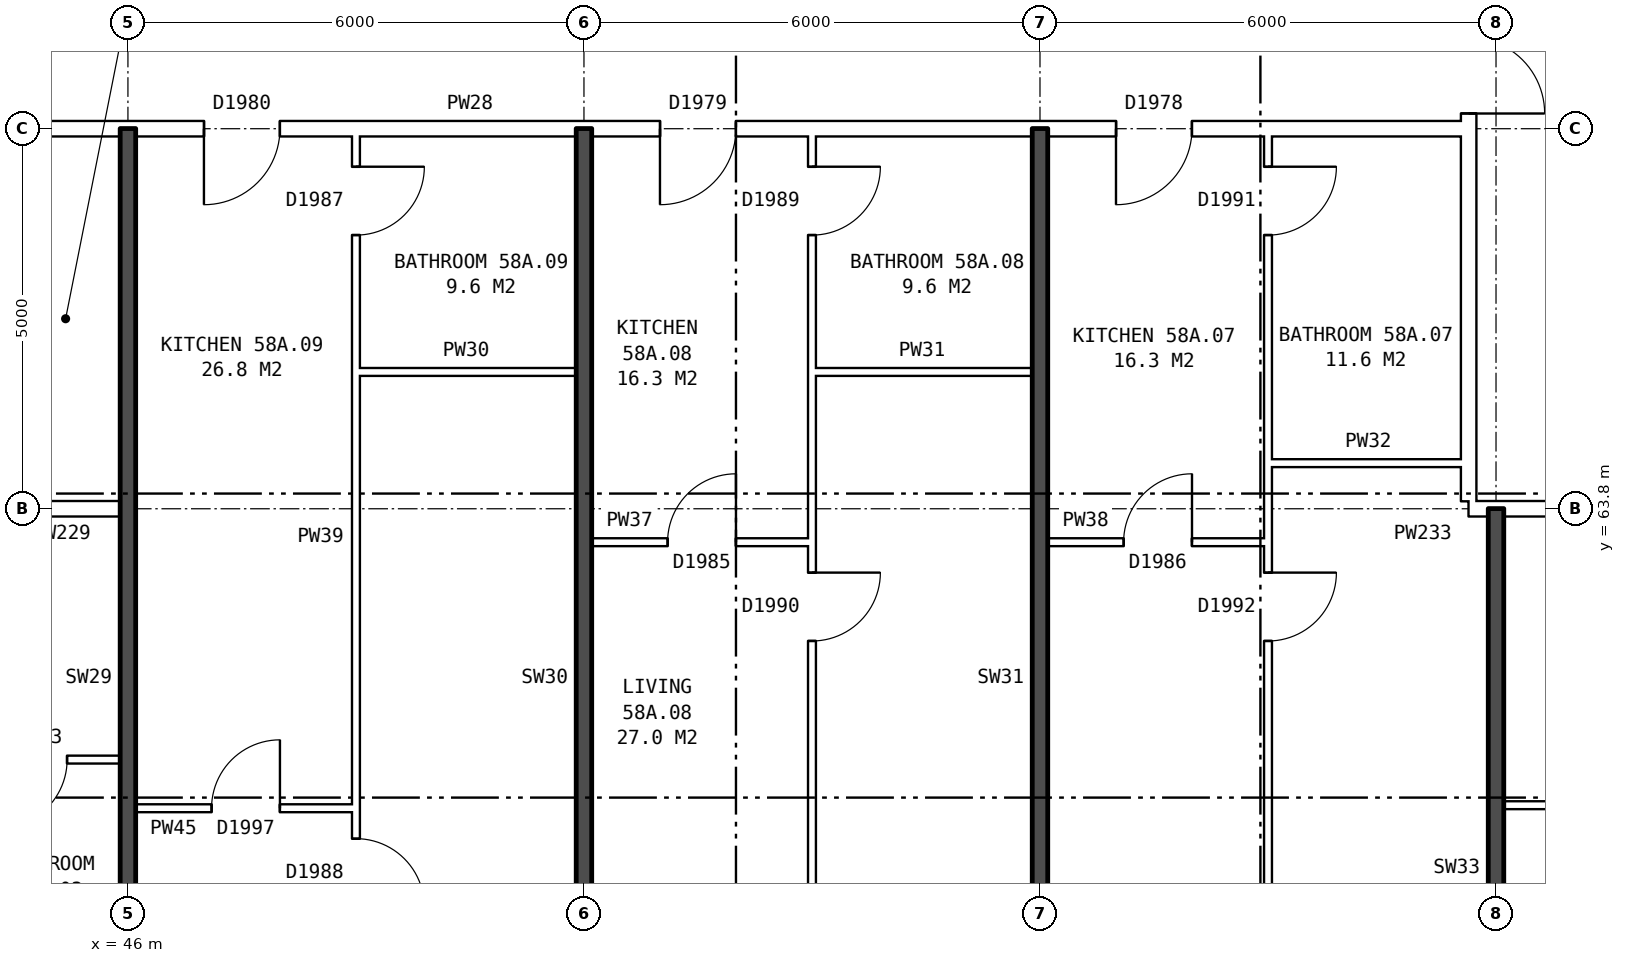
"""IFC4 building model, lengths in metres.
Left out: names, types, materials, properties, quantities, classifications, styles, units other than length and angle.
Written with IfcOpenShell. Run it as: python <this file> out.ifc"""

import sys

from ifc_helpers import new_model, si_unit, direction, frame, frame_2d, origin, place, context, subcontext, project, spatial, rectangle, extrude, element, fill, save


model = new_model("IFC4")
c1 = context("Model", 3, precision=1e-05, world=origin(), true_north=direction((0.0, 1.0)))
c2 = subcontext(c1, "Body", "Model", "MODEL_VIEW")
j1 = project(units=[si_unit("LENGTHUNIT", "METRE"), si_unit("PLANEANGLEUNIT", "RADIAN")], contexts=[c1])
p1 = place(None, origin())
s1 = spatial("IfcSite", under=j1, at=p1, CompositionType="ELEMENT")
p2 = place(p1, origin())
s2 = spatial("IfcBuilding", under=s1, at=p2, CompositionType="ELEMENT")
p3 = place(p2, frame((0.0, 0.0, 205.9)))
s3 = spatial("IfcBuildingStorey", under=s2, at=p3, CompositionType="ELEMENT", Elevation=205.9)
p4 = place(p3, frame((63.64, 63.9, 0.0), z_axis=(0.0, 0.0, 1.0), x_axis=(0.0, 1.0, 0.0)))
e1 = element("IfcWall", 1, at=p4, inside=s3, PredefinedType="PARTITIONING", context=c2, shape_type="SweptSolid", body=[
    extrude(rectangle(XDim=12.2, YDim=0.2, at=frame_2d((6.1, 0.0))), origin(), (0.0, 0.0, 1.0), 2.85),
])
p5 = place(p4, frame((5.1, 0.0, 0.0)))
e2 = element("IfcOpeningElement", 2, at=p5, cuts=e1, PredefinedType="OPENING", context=c2, shape_type="SweptSolid", body=[
    extrude(rectangle(XDim=2.0, YDim=2.1, at=frame_2d((1.0, 1.05))), frame((0.0, 0.11, 0.0), z_axis=(0.0, -1.0, 0.0), x_axis=(1.0, 0.0, 0.0)), (0.0, 0.0, 1.0), 0.22),
])
p6 = place(p3, frame((46.1, 59.86, 0.0), z_axis=(0.0, 0.0, 1.0), x_axis=(1.0, 0.0, 0.0)))
e3 = element("IfcWall", 3, at=p6, inside=s3, PredefinedType="PARTITIONING", context=c2, shape_type="SweptSolid", body=[
    extrude(rectangle(XDim=2.9, YDim=0.1, at=frame_2d((1.45, 0.0))), origin(), (0.0, 0.0, 1.0), 2.85),
])
p7 = place(p6, frame((1.0, 0.0, 0.0)))
e4 = element("IfcOpeningElement", 4, at=p7, cuts=e3, PredefinedType="OPENING", context=c2, shape_type="SweptSolid", body=[
    extrude(rectangle(XDim=0.9, YDim=2.1, at=frame_2d((0.45, 1.05))), frame((0.0, 0.06, 0.0), z_axis=(0.0, -1.0, 0.0), x_axis=(1.0, 0.0, 0.0)), (0.0, 0.0, 1.0), 0.12),
])
p8 = place(p3, frame((64.1, 59.9, 0.0), z_axis=(0.0, 0.0, 1.0), x_axis=(1.0, 0.0, 0.0)))
e5 = element("IfcWall", 5, at=p8, inside=s3, PredefinedType="PARTITIONING", context=c2, shape_type="SweptSolid", body=[
    extrude(rectangle(XDim=5.8, YDim=0.1, at=frame_2d((2.9, 0.0))), origin(), (0.0, 0.0, 1.0), 2.85),
])
p9 = place(p8, frame((3.6, 0.0, 0.0)))
e6 = element("IfcOpeningElement", 6, at=p9, cuts=e5, PredefinedType="OPENING", context=c2, shape_type="SweptSolid", body=[
    extrude(rectangle(XDim=0.9, YDim=2.1, at=frame_2d((0.45, 1.05))), frame((0.0, 0.06, 0.0), z_axis=(0.0, -1.0, 0.0), x_axis=(1.0, 0.0, 0.0)), (0.0, 0.0, 1.0), 0.12),
])
p10 = place(p8, frame((0.7, 0.0, 0.0)))
e7 = element("IfcOpeningElement", 7, at=p10, cuts=e5, PredefinedType="OPENING", context=c2, shape_type="SweptSolid", body=[
    extrude(rectangle(XDim=0.9, YDim=2.1, at=frame_2d((0.45, 1.05))), frame((0.0, 0.06, 0.0), z_axis=(0.0, -1.0, 0.0), x_axis=(1.0, 0.0, 0.0)), (0.0, 0.0, 1.0), 0.12),
])
p11 = place(p3, frame((40.1, 60.5, 0.0), z_axis=(0.0, 0.0, 1.0), x_axis=(1.0, 0.0, 0.0)))
e8 = element("IfcWall", 8, at=p11, inside=s3, PredefinedType="PARTITIONING", context=c2, shape_type="SweptSolid", body=[
    extrude(rectangle(XDim=5.8, YDim=0.1, at=frame_2d((2.9, 0.0))), origin(), (0.0, 0.0, 1.0), 2.85),
])
p12 = place(p11, frame((1.3, 0.0, 0.0)))
e9 = element("IfcOpeningElement", 9, at=p12, cuts=e8, PredefinedType="OPENING", context=c2, shape_type="SweptSolid", body=[
    extrude(rectangle(XDim=0.9, YDim=2.1, at=frame_2d((0.45, 1.05))), frame((0.0, 0.06, 0.0), z_axis=(0.0, -1.0, 0.0), x_axis=(1.0, 0.0, 0.0)), (0.0, 0.0, 1.0), 0.12),
])
p13 = place(p11, frame((4.2, 0.0, 0.0)))
e10 = element("IfcOpeningElement", 10, at=p13, cuts=e8, PredefinedType="OPENING", context=c2, shape_type="SweptSolid", body=[
    extrude(rectangle(XDim=0.9, YDim=2.1, at=frame_2d((0.45, 1.05))), frame((0.0, 0.06, 0.0), z_axis=(0.0, -1.0, 0.0), x_axis=(1.0, 0.0, 0.0)), (0.0, 0.0, 1.0), 0.12),
])
p14 = place(p3, frame((52.1, 63.36, 0.0), z_axis=(0.0, 0.0, 1.0), x_axis=(1.0, 0.0, 0.0)))
e11 = element("IfcWall", 11, at=p14, inside=s3, PredefinedType="PARTITIONING", context=c2, shape_type="SweptSolid", body=[
    extrude(rectangle(XDim=2.9, YDim=0.1, at=frame_2d((1.45, 0.0))), origin(), (0.0, 0.0, 1.0), 2.85),
])
p15 = place(p14, frame((1.0, 0.0, 0.0)))
e12 = element("IfcOpeningElement", 12, at=p15, cuts=e11, PredefinedType="OPENING", context=c2, shape_type="SweptSolid", body=[
    extrude(rectangle(XDim=0.9, YDim=2.1, at=frame_2d((0.45, 1.05))), frame((0.0, 0.06, 0.0), z_axis=(0.0, -1.0, 0.0), x_axis=(1.0, 0.0, 0.0)), (0.0, 0.0, 1.0), 0.12),
])
p16 = place(p3, frame((58.1, 63.36, 0.0), z_axis=(0.0, 0.0, 1.0), x_axis=(1.0, 0.0, 0.0)))
e13 = element("IfcWall", 13, at=p16, inside=s3, PredefinedType="PARTITIONING", context=c2, shape_type="SweptSolid", body=[
    extrude(rectangle(XDim=2.9, YDim=0.1, at=frame_2d((1.45, 0.0))), origin(), (0.0, 0.0, 1.0), 2.85),
])
p17 = place(p16, frame((1.0, 0.0, 0.0)))
e14 = element("IfcOpeningElement", 14, at=p17, cuts=e13, PredefinedType="OPENING", context=c2, shape_type="SweptSolid", body=[
    extrude(rectangle(XDim=0.9, YDim=2.1, at=frame_2d((0.45, 1.05))), frame((0.0, 0.06, 0.0), z_axis=(0.0, -1.0, 0.0), x_axis=(1.0, 0.0, 0.0)), (0.0, 0.0, 1.0), 0.12),
])
p18 = place(p3, frame((44.36, 63.8, 0.0), z_axis=(0.0, 0.0, 1.0), x_axis=(1.0, 0.0, 0.0)))
e15 = element("IfcWall", 15, at=p18, inside=s3, PredefinedType="PARTITIONING", context=c2, shape_type="SweptSolid", body=[
    extrude(rectangle(XDim=1.54, YDim=0.2, at=frame_2d((0.77, 0.0))), origin(), (0.0, 0.0, 1.0), 2.85),
])
p19 = place(p3, frame((63.64, 63.8, 0.0), z_axis=(0.0, 0.0, 1.0), x_axis=(1.0, 0.0, 0.0)))
e16 = element("IfcWall", 16, at=p19, inside=s3, PredefinedType="PARTITIONING", context=c2, shape_type="SweptSolid", body=[
    extrude(rectangle(XDim=3.0, YDim=0.2, at=frame_2d((1.5, 0.0))), origin(), (0.0, 0.0, 1.0), 2.85),
])
p20 = place(p19, frame((1.18, 0.0, 0.0)))
e17 = element("IfcOpeningElement", 17, at=p20, cuts=e16, PredefinedType="OPENING", context=c2, shape_type="SweptSolid", body=[
    extrude(rectangle(XDim=1.0, YDim=2.1, at=frame_2d((0.5, 1.05))), frame((0.0, 0.11, 0.0), z_axis=(0.0, -1.0, 0.0), x_axis=(1.0, 0.0, 0.0)), (0.0, 0.0, 1.0), 0.22),
])
p21 = place(p3, frame((61.0, 64.4, 0.0), z_axis=(0.0, 0.0, 1.0), x_axis=(1.0, 0.0, 0.0)))
e18 = element("IfcWall", 18, at=p21, inside=s3, PredefinedType="PARTITIONING", context=c2, shape_type="SweptSolid", body=[
    extrude(rectangle(XDim=2.64, YDim=0.1, at=frame_2d((1.32, 0.0))), origin(), (0.0, 0.0, 1.0), 2.85),
])
for number, where, z_axis, x_axis in (
    (19, (49.0, 65.6, 0.0), (0.0, 0.0, 1.0), (1.0, 0.0, 0.0)),
    (20, (55.0, 65.6, 0.0), (0.0, 0.0, 1.0), (1.0, 0.0, 0.0)),
):
    element("IfcWall", number, at=place(p3, frame(where, z_axis=z_axis, x_axis=x_axis)), inside=s3, PredefinedType="PARTITIONING", context=c2, shape_type="SweptSolid", body=[
        extrude(rectangle(XDim=2.9, YDim=0.1, at=frame_2d((1.45, 0.0))), origin(), (0.0, 0.0, 1.0), 2.85),
    ])
p22 = place(p3, frame((44.36, 68.8, 0.0), z_axis=(0.0, 0.0, 1.0), x_axis=(1.0, 0.0, 0.0)))
e21 = element("IfcWall", 21, at=p22, inside=s3, PredefinedType="PARTITIONING", context=c2, shape_type="SweptSolid", body=[
    extrude(rectangle(XDim=19.28, YDim=0.2, at=frame_2d((9.64, 0.0))), origin(), (0.0, 0.0, 1.0), 2.85),
])
p23 = place(p22, frame((14.64, 0.0, 0.0)))
e22 = element("IfcOpeningElement", 22, at=p23, cuts=e21, PredefinedType="OPENING", context=c2, shape_type="SweptSolid", body=[
    extrude(rectangle(XDim=1.0, YDim=2.1, at=frame_2d((0.5, 1.05))), frame((0.0, 0.11, 0.0), z_axis=(0.0, -1.0, 0.0), x_axis=(1.0, 0.0, 0.0)), (0.0, 0.0, 1.0), 0.22),
])
p24 = place(p22, frame((8.64, 0.0, 0.0)))
e23 = element("IfcOpeningElement", 23, at=p24, cuts=e21, PredefinedType="OPENING", context=c2, shape_type="SweptSolid", body=[
    extrude(rectangle(XDim=1.0, YDim=2.1, at=frame_2d((0.5, 1.05))), frame((0.0, 0.11, 0.0), z_axis=(0.0, -1.0, 0.0), x_axis=(1.0, 0.0, 0.0)), (0.0, 0.0, 1.0), 0.22),
])
p25 = place(p22, frame((2.64, 0.0, 0.0)))
e24 = element("IfcOpeningElement", 24, at=p25, cuts=e21, PredefinedType="OPENING", context=c2, shape_type="SweptSolid", body=[
    extrude(rectangle(XDim=1.0, YDim=2.1, at=frame_2d((0.5, 1.05))), frame((0.0, 0.11, 0.0), z_axis=(0.0, -1.0, 0.0), x_axis=(1.0, 0.0, 0.0)), (0.0, 0.0, 1.0), 0.22),
])
p26 = place(p3, frame((46.0, 54.36, 0.0), z_axis=(0.0, 0.0, 1.0), x_axis=(0.0, 1.0, 0.0)))
e25 = element("IfcWall", 25, at=p26, inside=s3, PredefinedType="SOLIDWALL", context=c2, shape_type="SweptSolid", body=[
    extrude(rectangle(XDim=14.44, YDim=0.2, at=frame_2d((7.22, 0.0))), origin(), (0.0, 0.0, 1.0), 2.85),
])
p27 = place(p3, frame((49.0, 54.36, 0.0), z_axis=(0.0, 0.0, 1.0), x_axis=(0.0, 1.0, 0.0)))
e26 = element("IfcWall", 26, at=p27, inside=s3, PredefinedType="PARTITIONING", context=c2, shape_type="SweptSolid", body=[
    extrude(rectangle(XDim=14.34, YDim=0.1, at=frame_2d((7.17, 0.0))), origin(), (0.0, 0.0, 1.0), 2.85),
])
p28 = place(p27, frame((4.2, 0.0, 0.0)))
e27 = element("IfcOpeningElement", 27, at=p28, cuts=e26, PredefinedType="OPENING", context=c2, shape_type="SweptSolid", body=[
    extrude(rectangle(XDim=0.9, YDim=2.1, at=frame_2d((0.45, 1.05))), frame((0.0, 0.06, 0.0), z_axis=(0.0, -1.0, 0.0), x_axis=(1.0, 0.0, 0.0)), (0.0, 0.0, 1.0), 0.12),
])
p29 = place(p27, frame((13.04, 0.0, 0.0)))
e28 = element("IfcOpeningElement", 28, at=p29, cuts=e26, PredefinedType="OPENING", context=c2, shape_type="SweptSolid", body=[
    extrude(rectangle(XDim=0.9, YDim=2.1, at=frame_2d((0.45, 1.05))), frame((0.0, 0.06, 0.0), z_axis=(0.0, -1.0, 0.0), x_axis=(1.0, 0.0, 0.0)), (0.0, 0.0, 1.0), 0.12),
])
p30 = place(p3, frame((52.0, 54.36, 0.0), z_axis=(0.0, 0.0, 1.0), x_axis=(0.0, 1.0, 0.0)))
e29 = element("IfcWall", 29, at=p30, inside=s3, PredefinedType="SOLIDWALL", context=c2, shape_type="SweptSolid", body=[
    extrude(rectangle(XDim=14.44, YDim=0.2, at=frame_2d((7.22, 0.0))), origin(), (0.0, 0.0, 1.0), 2.85),
])
p31 = place(p3, frame((55.0, 54.36, 0.0), z_axis=(0.0, 0.0, 1.0), x_axis=(0.0, 1.0, 0.0)))
e30 = element("IfcWall", 30, at=p31, inside=s3, PredefinedType="PARTITIONING", context=c2, shape_type="SweptSolid", body=[
    extrude(rectangle(XDim=14.34, YDim=0.1, at=frame_2d((7.17, 0.0))), origin(), (0.0, 0.0, 1.0), 2.85),
])
p32 = place(p31, frame((7.7, 0.0, 0.0)))
e31 = element("IfcOpeningElement", 31, at=p32, cuts=e30, PredefinedType="OPENING", context=c2, shape_type="SweptSolid", body=[
    extrude(rectangle(XDim=0.9, YDim=2.1, at=frame_2d((0.45, 1.05))), frame((0.0, 0.06, 0.0), z_axis=(0.0, -1.0, 0.0), x_axis=(1.0, 0.0, 0.0)), (0.0, 0.0, 1.0), 0.12),
])
p33 = place(p31, frame((13.04, 0.0, 0.0)))
e32 = element("IfcOpeningElement", 32, at=p33, cuts=e30, PredefinedType="OPENING", context=c2, shape_type="SweptSolid", body=[
    extrude(rectangle(XDim=0.9, YDim=2.1, at=frame_2d((0.45, 1.05))), frame((0.0, 0.06, 0.0), z_axis=(0.0, -1.0, 0.0), x_axis=(1.0, 0.0, 0.0)), (0.0, 0.0, 1.0), 0.12),
])
p34 = place(p3, frame((58.0, 54.36, 0.0), z_axis=(0.0, 0.0, 1.0), x_axis=(0.0, 1.0, 0.0)))
e33 = element("IfcWall", 33, at=p34, inside=s3, PredefinedType="SOLIDWALL", context=c2, shape_type="SweptSolid", body=[
    extrude(rectangle(XDim=14.44, YDim=0.2, at=frame_2d((7.22, 0.0))), origin(), (0.0, 0.0, 1.0), 2.85),
])
p35 = place(p3, frame((61.0, 54.36, 0.0), z_axis=(0.0, 0.0, 1.0), x_axis=(0.0, 1.0, 0.0)))
e34 = element("IfcWall", 34, at=p35, inside=s3, PredefinedType="PARTITIONING", context=c2, shape_type="SweptSolid", body=[
    extrude(rectangle(XDim=14.34, YDim=0.1, at=frame_2d((7.17, 0.0))), origin(), (0.0, 0.0, 1.0), 2.85),
])
p36 = place(p35, frame((7.7, 0.0, 0.0)))
e35 = element("IfcOpeningElement", 35, at=p36, cuts=e34, PredefinedType="OPENING", context=c2, shape_type="SweptSolid", body=[
    extrude(rectangle(XDim=0.9, YDim=2.1, at=frame_2d((0.45, 1.05))), frame((0.0, 0.06, 0.0), z_axis=(0.0, -1.0, 0.0), x_axis=(1.0, 0.0, 0.0)), (0.0, 0.0, 1.0), 0.12),
])
p37 = place(p35, frame((13.04, 0.0, 0.0)))
e36 = element("IfcOpeningElement", 36, at=p37, cuts=e34, PredefinedType="OPENING", context=c2, shape_type="SweptSolid", body=[
    extrude(rectangle(XDim=0.9, YDim=2.1, at=frame_2d((0.45, 1.05))), frame((0.0, 0.06, 0.0), z_axis=(0.0, -1.0, 0.0), x_axis=(1.0, 0.0, 0.0)), (0.0, 0.0, 1.0), 0.12),
])
p38 = place(p3, frame((64.0, 54.36, 0.0), z_axis=(0.0, 0.0, 1.0), x_axis=(0.0, 1.0, 0.0)))
e37 = element("IfcWall", 37, at=p38, inside=s3, PredefinedType="SOLIDWALL", context=c2, shape_type="SweptSolid", body=[
    extrude(rectangle(XDim=9.44, YDim=0.2, at=frame_2d((4.72, 0.0))), origin(), (0.0, 0.0, 1.0), 2.85),
])
p39 = place(p5, frame((2.0, 0.0, 0.0), z_axis=(0.0, 0.0, 1.0), x_axis=(-1.0, 0.0, 0.0)))
e38 = element("IfcDoor", 38, at=p39, inside=s3, OperationType="DOUBLE_DOOR_SINGLE_SWING", PredefinedType="DOOR", context=c2, shape_type="SweptSolid", body=[
    extrude(rectangle(XDim=2.0, YDim=2.1, at=frame_2d((1.0, 1.05))), frame((0.0, 0.025, 0.0), z_axis=(0.0, -1.0, 0.0), x_axis=(1.0, 0.0, 0.0)), (0.0, 0.0, 1.0), 0.05),
])
fill(e2, e38)
p40 = place(p13, frame((0.9, 0.0, 0.0), z_axis=(0.0, 0.0, 1.0), x_axis=(-1.0, 0.0, 0.0)))
e39 = element("IfcDoor", 39, at=p40, inside=s3, OperationType="SINGLE_SWING_RIGHT", PredefinedType="DOOR", context=c2, shape_type="SweptSolid", body=[
    extrude(rectangle(XDim=0.9, YDim=2.1, at=frame_2d((0.45, 1.05))), frame((0.0, 0.025, 0.0), z_axis=(0.0, -1.0, 0.0), x_axis=(1.0, 0.0, 0.0)), (0.0, 0.0, 1.0), 0.05),
])
fill(e10, e39)
p41 = place(p36, frame((0.9, 0.0, 0.0), z_axis=(0.0, 0.0, 1.0), x_axis=(-1.0, 0.0, 0.0)))
e40 = element("IfcDoor", 40, at=p41, inside=s3, OperationType="SINGLE_SWING_LEFT", PredefinedType="DOOR", context=c2, shape_type="SweptSolid", body=[
    extrude(rectangle(XDim=0.9, YDim=2.1, at=frame_2d((0.45, 1.05))), frame((0.0, 0.025, 0.0), z_axis=(0.0, -1.0, 0.0), x_axis=(1.0, 0.0, 0.0)), (0.0, 0.0, 1.0), 0.05),
])
fill(e35, e40)
p42 = place(p23, frame((1.0, 0.0, 0.0), z_axis=(0.0, 0.0, 1.0), x_axis=(-1.0, 0.0, 0.0)))
e41 = element("IfcDoor", 41, at=p42, inside=s3, OperationType="SINGLE_SWING_RIGHT", PredefinedType="DOOR", context=c2, shape_type="SweptSolid", body=[
    extrude(rectangle(XDim=1.0, YDim=2.1, at=frame_2d((0.5, 1.05))), frame((0.0, 0.025, 0.0), z_axis=(0.0, -1.0, 0.0), x_axis=(1.0, 0.0, 0.0)), (0.0, 0.0, 1.0), 0.05),
])
fill(e22, e41)
p43 = place(p17, origin())
e42 = element("IfcDoor", 42, at=p43, inside=s3, OperationType="SINGLE_SWING_RIGHT", PredefinedType="DOOR", context=c2, shape_type="SweptSolid", body=[
    extrude(rectangle(XDim=0.9, YDim=2.1, at=frame_2d((0.45, 1.05))), frame((0.0, 0.025, 0.0), z_axis=(0.0, -1.0, 0.0), x_axis=(1.0, 0.0, 0.0)), (0.0, 0.0, 1.0), 0.05),
])
fill(e14, e42)
p44 = place(p37, frame((0.9, 0.0, 0.0), z_axis=(0.0, 0.0, 1.0), x_axis=(-1.0, 0.0, 0.0)))
e43 = element("IfcDoor", 43, at=p44, inside=s3, OperationType="SINGLE_SWING_LEFT", PredefinedType="DOOR", context=c2, shape_type="SweptSolid", body=[
    extrude(rectangle(XDim=0.9, YDim=2.1, at=frame_2d((0.45, 1.05))), frame((0.0, 0.025, 0.0), z_axis=(0.0, -1.0, 0.0), x_axis=(1.0, 0.0, 0.0)), (0.0, 0.0, 1.0), 0.05),
])
fill(e36, e43)
p45 = place(p32, frame((0.9, 0.0, 0.0), z_axis=(0.0, 0.0, 1.0), x_axis=(-1.0, 0.0, 0.0)))
e44 = element("IfcDoor", 44, at=p45, inside=s3, OperationType="SINGLE_SWING_LEFT", PredefinedType="DOOR", context=c2, shape_type="SweptSolid", body=[
    extrude(rectangle(XDim=0.9, YDim=2.1, at=frame_2d((0.45, 1.05))), frame((0.0, 0.025, 0.0), z_axis=(0.0, -1.0, 0.0), x_axis=(1.0, 0.0, 0.0)), (0.0, 0.0, 1.0), 0.05),
])
fill(e31, e44)
p46 = place(p24, frame((1.0, 0.0, 0.0), z_axis=(0.0, 0.0, 1.0), x_axis=(-1.0, 0.0, 0.0)))
e45 = element("IfcDoor", 45, at=p46, inside=s3, OperationType="SINGLE_SWING_RIGHT", PredefinedType="DOOR", context=c2, shape_type="SweptSolid", body=[
    extrude(rectangle(XDim=1.0, YDim=2.1, at=frame_2d((0.5, 1.05))), frame((0.0, 0.025, 0.0), z_axis=(0.0, -1.0, 0.0), x_axis=(1.0, 0.0, 0.0)), (0.0, 0.0, 1.0), 0.05),
])
fill(e23, e45)
p47 = place(p15, origin())
e46 = element("IfcDoor", 46, at=p47, inside=s3, OperationType="SINGLE_SWING_RIGHT", PredefinedType="DOOR", context=c2, shape_type="SweptSolid", body=[
    extrude(rectangle(XDim=0.9, YDim=2.1, at=frame_2d((0.45, 1.05))), frame((0.0, 0.025, 0.0), z_axis=(0.0, -1.0, 0.0), x_axis=(1.0, 0.0, 0.0)), (0.0, 0.0, 1.0), 0.05),
])
fill(e12, e46)
p48 = place(p33, frame((0.9, 0.0, 0.0), z_axis=(0.0, 0.0, 1.0), x_axis=(-1.0, 0.0, 0.0)))
e47 = element("IfcDoor", 47, at=p48, inside=s3, OperationType="SINGLE_SWING_LEFT", PredefinedType="DOOR", context=c2, shape_type="SweptSolid", body=[
    extrude(rectangle(XDim=0.9, YDim=2.1, at=frame_2d((0.45, 1.05))), frame((0.0, 0.025, 0.0), z_axis=(0.0, -1.0, 0.0), x_axis=(1.0, 0.0, 0.0)), (0.0, 0.0, 1.0), 0.05),
])
fill(e32, e47)
p49 = place(p28, frame((0.9, 0.0, 0.0), z_axis=(0.0, 0.0, 1.0), x_axis=(-1.0, 0.0, 0.0)))
e48 = element("IfcDoor", 48, at=p49, inside=s3, OperationType="SINGLE_SWING_RIGHT", PredefinedType="DOOR", context=c2, shape_type="SweptSolid", body=[
    extrude(rectangle(XDim=0.9, YDim=2.1, at=frame_2d((0.45, 1.05))), frame((0.0, 0.025, 0.0), z_axis=(0.0, -1.0, 0.0), x_axis=(1.0, 0.0, 0.0)), (0.0, 0.0, 1.0), 0.05),
])
fill(e27, e48)
p50 = place(p25, frame((1.0, 0.0, 0.0), z_axis=(0.0, 0.0, 1.0), x_axis=(-1.0, 0.0, 0.0)))
e49 = element("IfcDoor", 49, at=p50, inside=s3, OperationType="SINGLE_SWING_RIGHT", PredefinedType="DOOR", context=c2, shape_type="SweptSolid", body=[
    extrude(rectangle(XDim=1.0, YDim=2.1, at=frame_2d((0.5, 1.05))), frame((0.0, 0.025, 0.0), z_axis=(0.0, -1.0, 0.0), x_axis=(1.0, 0.0, 0.0)), (0.0, 0.0, 1.0), 0.05),
])
fill(e24, e49)
p51 = place(p7, origin())
e50 = element("IfcDoor", 50, at=p51, inside=s3, OperationType="SINGLE_SWING_RIGHT", PredefinedType="DOOR", context=c2, shape_type="SweptSolid", body=[
    extrude(rectangle(XDim=0.9, YDim=2.1, at=frame_2d((0.45, 1.05))), frame((0.0, 0.025, 0.0), z_axis=(0.0, -1.0, 0.0), x_axis=(1.0, 0.0, 0.0)), (0.0, 0.0, 1.0), 0.05),
])
fill(e4, e50)
p52 = place(p29, frame((0.9, 0.0, 0.0), z_axis=(0.0, 0.0, 1.0), x_axis=(-1.0, 0.0, 0.0)))
e51 = element("IfcDoor", 51, at=p52, inside=s3, OperationType="SINGLE_SWING_LEFT", PredefinedType="DOOR", context=c2, shape_type="SweptSolid", body=[
    extrude(rectangle(XDim=0.9, YDim=2.1, at=frame_2d((0.45, 1.05))), frame((0.0, 0.025, 0.0), z_axis=(0.0, -1.0, 0.0), x_axis=(1.0, 0.0, 0.0)), (0.0, 0.0, 1.0), 0.05),
])
fill(e28, e51)
save(model, sys.argv[1])
